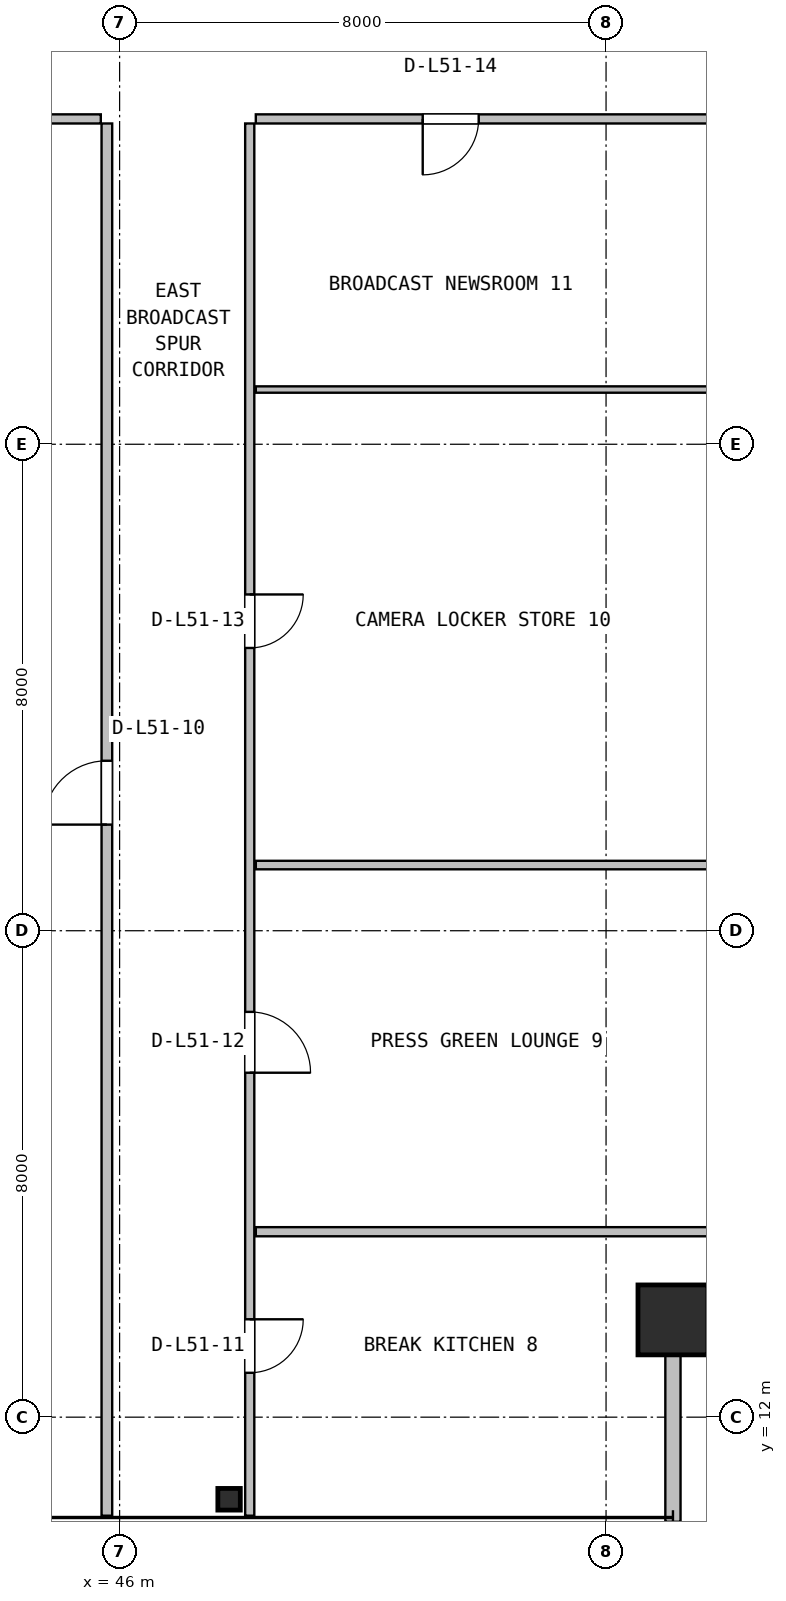
"""IFC4 building model, lengths in metres.
Left out: names, types, materials, properties, quantities, classifications, styles, units other than length and angle.
Written with IfcOpenShell. Run it as: python <this file> out.ifc"""

import sys

from ifc_helpers import new_model, si_unit, direction, frame, frame_2d, origin, origin_2d, place, context, subcontext, project, spatial, rectangle, hollow_rectangle, i_section, extrude, source, transform, mapped, element, fill, save


model = new_model("IFC4")
c1 = context("Model", 3, precision=1e-05, world=origin(), true_north=direction((0.0, 1.0)))
c2 = subcontext(c1, "Body", "Model", "MODEL_VIEW")
j1 = project(units=[si_unit("LENGTHUNIT", "METRE"), si_unit("PLANEANGLEUNIT", "RADIAN")], contexts=[c1])
p1 = place(None, origin())
s1 = spatial("IfcSite", under=j1, at=p1, CompositionType="ELEMENT")
p2 = place(p1, origin())
s2 = spatial("IfcBuilding", under=s1, at=p2, CompositionType="ELEMENT")
p3 = place(p2, frame((0.0, 0.0, 207.4)))
s3 = spatial("IfcBuildingStorey", under=s2, at=p3, CompositionType="ELEMENT", Elevation=207.4)
m1 = source(origin(), c2, "Body", "SweptSolid", [
    extrude(hollow_rectangle(XDim=1.15, YDim=1.15, WallThickness=0.045, at=origin_2d()), origin(), (0.0, 0.0, 1.0), 3.8),
])
p4 = place(p3, frame((55.1, 13.6, 0.0), z_axis=(0.0, 0.0, 1.0), x_axis=(1.0, 0.0, 0.0)))
e1 = element("IfcColumn", 1, at=p4, inside=s3, PredefinedType="COLUMN", context=c2, shape_type="MappedRepresentation", body=[
    mapped(m1, transform((0.0, 0.0, 0.0), x_axis=(1.0, 0.0, 0.0), y_axis=(0.0, 1.0, 0.0), z_axis=(0.0, 0.0, 1.0), scale=1.0)),
])
m2 = source(origin(), c2, "Body", "SweptSolid", [
    extrude(i_section(OverallWidth=0.369, OverallDepth=0.356, WebThickness=0.011, FlangeThickness=0.018, FilletRadius=0.016, at=origin_2d()), origin(), (0.0, 0.0, 1.0), 3.8),
])
p5 = place(p3, frame((47.8, 10.65, 0.0), z_axis=(0.0, 0.0, 1.0), x_axis=(1.0, 0.0, 0.0)))
e2 = element("IfcColumn", 2, at=p5, inside=s3, PredefinedType="COLUMN", context=c2, shape_type="MappedRepresentation", body=[
    mapped(m2, transform((0.0, 0.0, 0.0), x_axis=(1.0, 0.0, 0.0), y_axis=(0.0, 1.0, 0.0), z_axis=(0.0, 0.0, 1.0), scale=1.0)),
])
p6 = place(p3, frame((55.1, 10.28, 0.0), z_axis=(0.0, 0.0, 1.0), x_axis=(0.0, 1.0, 0.0)))
e3 = element("IfcWall", 3, at=p6, inside=s3, PredefinedType="SOLIDWALL", context=c2, shape_type="SweptSolid", body=[
    extrude(rectangle(XDim=3.4, YDim=0.25, at=frame_2d((1.7, 0.0))), origin(), (0.0, 0.0, 1.0), 3.171),
])
p7 = place(p3, frame((22.9, 33.35, 0.0), z_axis=(0.0, 0.0, 1.0), x_axis=(1.0, 0.0, 0.0)))
e4 = element("IfcWall", 4, at=p7, inside=s3, PredefinedType="PARTITIONING", context=c2, shape_type="SweptSolid", body=[
    extrude(rectangle(XDim=22.79, YDim=0.15, at=frame_2d((11.395, 0.0))), origin(), (0.0, 0.0, 1.0), 2.908),
])
p8 = place(p7, frame((8.84, 0.0, 0.0)))
e5 = element("IfcOpeningElement", 5, at=p8, cuts=e4, PredefinedType="OPENING", context=c2, shape_type="SweptSolid", body=[
    extrude(rectangle(XDim=0.92, YDim=2.08, at=frame_2d((0.46, 1.04))), frame((0.0, 0.085, 0.0), z_axis=(0.0, -1.0, 0.0), x_axis=(1.0, 0.0, 0.0)), (0.0, 0.0, 1.0), 0.17),
])
p9 = place(p3, frame((45.79, 10.38, 0.0), z_axis=(0.0, 0.0, 1.0), x_axis=(0.0, 1.0, 0.0)))
e6 = element("IfcWall", 6, at=p9, inside=s3, PredefinedType="PARTITIONING", context=c2, shape_type="SweptSolid", body=[
    extrude(rectangle(XDim=22.895, YDim=0.175, at=frame_2d((11.448, 0.0))), origin(), (0.0, 0.0, 1.0), 2.908),
])
p10 = place(p9, frame((11.365, 0.0, 0.0)))
e7 = element("IfcOpeningElement", 7, at=p10, cuts=e6, PredefinedType="OPENING", context=c2, shape_type="SweptSolid", body=[
    extrude(rectangle(XDim=1.05, YDim=2.1, at=frame_2d((0.525, 1.05))), frame((0.0, 0.098, 0.0), z_axis=(0.0, -1.0, 0.0), x_axis=(1.0, 0.0, 0.0)), (0.0, 0.0, 1.0), 0.195),
])
p11 = place(p3, frame((48.24, 15.05, 0.0), z_axis=(0.0, 0.0, 1.0), x_axis=(1.0, 0.0, 0.0)))
e8 = element("IfcWall", 8, at=p11, inside=s3, PredefinedType="PARTITIONING", context=c2, shape_type="SweptSolid", body=[
    extrude(rectangle(XDim=10.08, YDim=0.15, at=frame_2d((5.04, 0.0))), origin(), (0.0, 0.0, 1.0), 3.171),
])
p12 = place(p3, frame((48.14, 10.38, 0.0), z_axis=(0.0, 0.0, 1.0), x_axis=(0.0, 1.0, 0.0)))
e9 = element("IfcWall", 9, at=p12, inside=s3, PredefinedType="PARTITIONING", context=c2, shape_type="SweptSolid", body=[
    extrude(rectangle(XDim=22.895, YDim=0.15, at=frame_2d((11.448, 0.0))), origin(), (0.0, 0.0, 1.0), 3.171),
])
p13 = place(p12, frame((2.35, 0.0, 0.0)))
e10 = element("IfcOpeningElement", 10, at=p13, cuts=e9, PredefinedType="OPENING", context=c2, shape_type="SweptSolid", body=[
    extrude(rectangle(XDim=0.88, YDim=2.06, at=frame_2d((0.44, 1.03))), frame((0.0, 0.085, 0.0), z_axis=(0.0, -1.0, 0.0), x_axis=(1.0, 0.0, 0.0)), (0.0, 0.0, 1.0), 0.17),
])
p14 = place(p12, frame((7.285, 0.0, 0.0)))
e11 = element("IfcOpeningElement", 11, at=p14, cuts=e9, PredefinedType="OPENING", context=c2, shape_type="SweptSolid", body=[
    extrude(rectangle(XDim=1.0, YDim=2.1, at=frame_2d((0.5, 1.05))), frame((0.0, 0.085, 0.0), z_axis=(0.0, -1.0, 0.0), x_axis=(1.0, 0.0, 0.0)), (0.0, 0.0, 1.0), 0.17),
])
p15 = place(p12, frame((14.27, 0.0, 0.0)))
e12 = element("IfcOpeningElement", 12, at=p15, cuts=e9, PredefinedType="OPENING", context=c2, shape_type="SweptSolid", body=[
    extrude(rectangle(XDim=0.88, YDim=2.06, at=frame_2d((0.44, 1.03))), frame((0.0, 0.085, 0.0), z_axis=(0.0, -1.0, 0.0), x_axis=(1.0, 0.0, 0.0)), (0.0, 0.0, 1.0), 0.17),
])
p16 = place(p3, frame((48.24, 21.08, 0.0), z_axis=(0.0, 0.0, 1.0), x_axis=(1.0, 0.0, 0.0)))
e13 = element("IfcWall", 13, at=p16, inside=s3, PredefinedType="PARTITIONING", context=c2, shape_type="SweptSolid", body=[
    extrude(rectangle(XDim=10.08, YDim=0.14, at=frame_2d((5.04, 0.0))), origin(), (0.0, 0.0, 1.0), 3.171),
])
p17 = place(p3, frame((48.24, 28.9, 0.0), z_axis=(0.0, 0.0, 1.0), x_axis=(1.0, 0.0, 0.0)))
e14 = element("IfcWall", 14, at=p17, inside=s3, PredefinedType="PARTITIONING", context=c2, shape_type="SweptSolid", body=[
    extrude(rectangle(XDim=10.08, YDim=0.105, at=frame_2d((5.04, 0.0))), origin(), (0.0, 0.0, 1.0), 3.171),
])
p18 = place(p3, frame((48.24, 33.35, 0.0), z_axis=(0.0, 0.0, 1.0), x_axis=(1.0, 0.0, 0.0)))
e15 = element("IfcWall", 15, at=p18, inside=s3, PredefinedType="PARTITIONING", context=c2, shape_type="SweptSolid", body=[
    extrude(rectangle(XDim=10.08, YDim=0.15, at=frame_2d((5.04, 0.0))), origin(), (0.0, 0.0, 1.0), 3.171),
])
p19 = place(p18, frame((2.745, 0.0, 0.0)))
e16 = element("IfcOpeningElement", 16, at=p19, cuts=e15, PredefinedType="OPENING", context=c2, shape_type="SweptSolid", body=[
    extrude(rectangle(XDim=0.92, YDim=2.08, at=frame_2d((0.46, 1.04))), frame((0.0, 0.085, 0.0), z_axis=(0.0, -1.0, 0.0), x_axis=(1.0, 0.0, 0.0)), (0.0, 0.0, 1.0), 0.17),
])
m3 = source(origin(), c2, "Body", "SweptSolid", [
    extrude(rectangle(XDim=1.05, YDim=2.1, at=frame_2d((0.525, 1.05))), frame((0.0, 0.025, 0.0), z_axis=(0.0, -1.0, 0.0), x_axis=(1.0, 0.0, 0.0)), (0.0, 0.0, 1.0), 0.05),
])
p20 = place(p10, origin())
e17 = element("IfcDoor", 17, at=p20, inside=s3, OperationType="SINGLE_SWING_LEFT", PredefinedType="DOOR", context=c2, shape_type="MappedRepresentation", body=[
    mapped(m3, transform((0.0, 0.0, 0.0), x_axis=(1.0, 0.0, 0.0), y_axis=(0.0, 1.0, 0.0), z_axis=(0.0, 0.0, 1.0), scale=1.0)),
])
fill(e7, e17)
m4 = source(origin(), c2, "Body", "SweptSolid", [
    extrude(rectangle(XDim=0.88, YDim=2.06, at=frame_2d((0.44, 1.03))), frame((0.0, 0.025, 0.0), z_axis=(0.0, -1.0, 0.0), x_axis=(1.0, 0.0, 0.0)), (0.0, 0.0, 1.0), 0.05),
])
p21 = place(p13, frame((0.88, 0.0, 0.0), z_axis=(0.0, 0.0, 1.0), x_axis=(-1.0, 0.0, 0.0)))
e18 = element("IfcDoor", 18, at=p21, inside=s3, OperationType="SINGLE_SWING_RIGHT", PredefinedType="DOOR", context=c2, shape_type="MappedRepresentation", body=[
    mapped(m4, transform((0.0, 0.0, 0.0), x_axis=(1.0, 0.0, 0.0), y_axis=(0.0, 1.0, 0.0), z_axis=(0.0, 0.0, 1.0), scale=1.0)),
])
fill(e10, e18)
m5 = source(origin(), c2, "Body", "SweptSolid", [
    extrude(rectangle(XDim=1.0, YDim=2.1, at=frame_2d((0.5, 1.05))), frame((0.0, 0.025, 0.0), z_axis=(0.0, -1.0, 0.0), x_axis=(1.0, 0.0, 0.0)), (0.0, 0.0, 1.0), 0.05),
])
p22 = place(p14, frame((1.0, 0.0, 0.0), z_axis=(0.0, 0.0, 1.0), x_axis=(-1.0, 0.0, 0.0)))
e19 = element("IfcDoor", 19, at=p22, inside=s3, OperationType="SINGLE_SWING_LEFT", PredefinedType="DOOR", context=c2, shape_type="MappedRepresentation", body=[
    mapped(m5, transform((0.0, 0.0, 0.0), x_axis=(1.0, 0.0, 0.0), y_axis=(0.0, 1.0, 0.0), z_axis=(0.0, 0.0, 1.0), scale=1.0)),
])
fill(e11, e19)
p23 = place(p15, frame((0.88, 0.0, 0.0), z_axis=(0.0, 0.0, 1.0), x_axis=(-1.0, 0.0, 0.0)))
e20 = element("IfcDoor", 20, at=p23, inside=s3, OperationType="SINGLE_SWING_RIGHT", PredefinedType="DOOR", context=c2, shape_type="MappedRepresentation", body=[
    mapped(m4, transform((0.0, 0.0, 0.0), x_axis=(1.0, 0.0, 0.0), y_axis=(0.0, 1.0, 0.0), z_axis=(0.0, 0.0, 1.0), scale=1.0)),
])
fill(e12, e20)
m6 = source(origin(), c2, "Body", "SweptSolid", [
    extrude(rectangle(XDim=0.92, YDim=2.08, at=frame_2d((0.46, 1.04))), frame((0.0, 0.025, 0.0), z_axis=(0.0, -1.0, 0.0), x_axis=(1.0, 0.0, 0.0)), (0.0, 0.0, 1.0), 0.05),
])
p24 = place(p19, frame((0.92, 0.0, 0.0), z_axis=(0.0, 0.0, 1.0), x_axis=(-1.0, 0.0, 0.0)))
e21 = element("IfcDoor", 21, at=p24, inside=s3, OperationType="SINGLE_SWING_LEFT", PredefinedType="DOOR", context=c2, shape_type="MappedRepresentation", body=[
    mapped(m6, transform((0.0, 0.0, 0.0), x_axis=(1.0, 0.0, 0.0), y_axis=(0.0, 1.0, 0.0), z_axis=(0.0, 0.0, 1.0), scale=1.0)),
])
fill(e16, e21)
save(model, sys.argv[1])
